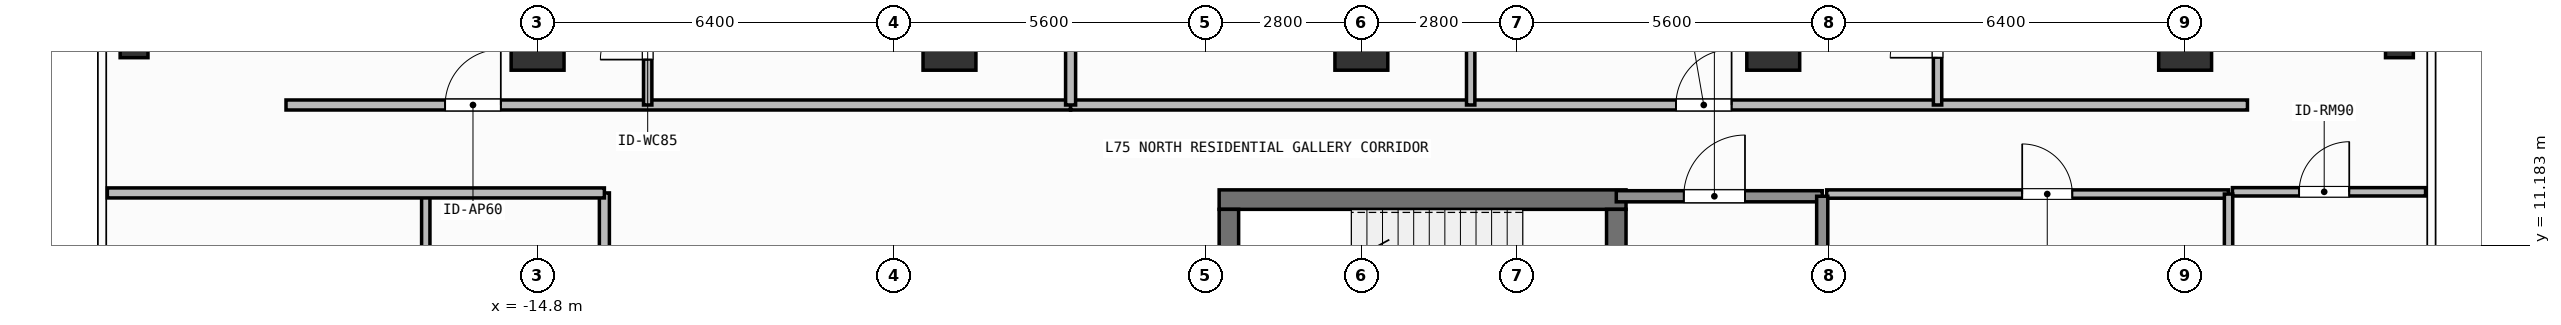
"""IFC4 building model, lengths in metres.
Left out: names, types, materials, properties, quantities, classifications, styles, units other than length and angle.
Written with IfcOpenShell. Run it as: python <this file> out.ifc"""

import sys

from ifc_helpers import new_model, si_unit, direction, frame, frame_2d, origin, origin_2d, place, context, subcontext, project, spatial, rectangle, hollow_rectangle, extrude, element, fill, save


model = new_model("IFC4")
c1 = context("Model", 3, precision=1e-05, world=origin(), true_north=direction((0.0, 1.0)))
c2 = subcontext(c1, "Body", "Model", "MODEL_VIEW")
j1 = project(units=[si_unit("LENGTHUNIT", "METRE"), si_unit("PLANEANGLEUNIT", "RADIAN")], contexts=[c1])
p1 = place(None, origin())
s1 = spatial("IfcSite", under=j1, at=p1, CompositionType="ELEMENT")
p2 = place(p1, origin())
s2 = spatial("IfcBuilding", under=s1, at=p2, CompositionType="ELEMENT")
p3 = place(p2, frame((0.0, 0.0, 305.4)))
s3 = spatial("IfcBuildingStorey", under=s2, at=p3, CompositionType="ELEMENT", Elevation=305.4)
p4 = place(p3, frame((-2.555, 12.0, 0.0), z_axis=(0.0, 0.0, 1.0), x_axis=(1.0, 0.0, 0.0)))
e1 = element("IfcWall", 1, at=p4, inside=s3, PredefinedType="SHEAR", context=c2, shape_type="SweptSolid", body=[
    extrude(rectangle(XDim=7.31, YDim=0.35, at=frame_2d((3.655, 0.0))), origin(), (0.0, 0.0, 1.0), 3.9),
])
p5 = place(p3, frame((-2.38, 8.9, 0.0), z_axis=(0.0, 0.0, 1.0), x_axis=(0.0, 1.0, 0.0)))
e2 = element("IfcWall", 2, at=p5, inside=s3, PredefinedType="SHEAR", context=c2, shape_type="SweptSolid", body=[
    extrude(rectangle(XDim=2.925, YDim=0.35, at=frame_2d((1.462, 0.0))), origin(), (0.0, 0.0, 1.0), 3.9),
])
p6 = place(p3, frame((4.58, 11.825, 0.0), z_axis=(0.0, 0.0, 1.0), x_axis=(0.0, -1.0, 0.0)))
e3 = element("IfcWall", 3, at=p6, inside=s3, PredefinedType="SHEAR", context=c2, shape_type="SweptSolid", body=[
    extrude(rectangle(XDim=2.925, YDim=0.35, at=frame_2d((1.462, 0.0))), origin(), (0.0, 0.0, 1.0), 3.9),
])
p7 = place(p6, frame((0.913, 0.0, 0.0)))
e4 = element("IfcOpeningElement", 4, at=p7, cuts=e3, PredefinedType="OPENING", context=c2, shape_type="SweptSolid", body=[
    extrude(rectangle(XDim=1.1, YDim=2.15, at=frame_2d((0.55, 1.075))), frame((0.0, 0.185, 0.0), z_axis=(0.0, -1.0, 0.0), x_axis=(1.0, 0.0, 0.0)), (0.0, 0.0, 1.0), 0.37),
])
for number, where, z_axis, x_axis in (
    (5, (-14.8, 14.8, 0.0), (0.0, 0.0, 1.0), (1.0, 0.0, 0.0)),
    (6, (-7.4, 14.8, 0.0), (0.0, 0.0, 1.0), (1.0, 0.0, 0.0)),
    (7, (0.0, 14.8, 0.0), (0.0, 0.0, 1.0), (1.0, 0.0, 0.0)),
    (8, (7.4, 14.8, 0.0), (0.0, 0.0, 1.0), (1.0, 0.0, 0.0)),
    (9, (14.8, 14.8, 0.0), (0.0, 0.0, 1.0), (1.0, 0.0, 0.0)),
):
    element("IfcColumn", number, at=place(p3, frame(where, z_axis=z_axis, x_axis=x_axis)), inside=s3, PredefinedType="COLUMN", context=c2, shape_type="SweptSolid", body=[
        extrude(rectangle(XDim=0.95, YDim=0.95, at=origin_2d()), origin(), (0.0, 0.0, 1.0), 3.9),
    ])
for number, where, z_axis, x_axis in (
    (10, (-22.05, 14.8, 0.0), (0.0, 0.0, 1.0), (1.0, 0.0, 0.0)),
    (11, (18.65, 14.8, 0.0), (0.0, 0.0, 1.0), (1.0, 0.0, 0.0)),
):
    element("IfcColumn", number, at=place(p3, frame(where, z_axis=z_axis, x_axis=x_axis)), inside=s3, PredefinedType="COLUMN", context=c2, shape_type="SweptSolid", body=[
        extrude(hollow_rectangle(XDim=0.5, YDim=0.5, WallThickness=0.025, at=origin_2d()), origin(), (0.0, 0.0, 1.0), 3.9),
    ])
p8 = place(p3, frame((4.58, 12.06, 0.0), z_axis=(0.0, 0.0, 1.0), x_axis=(1.0, 0.0, 0.0)))
e12 = element("IfcWall", 12, at=p8, inside=s3, PredefinedType="SOLIDWALL", context=c2, shape_type="SweptSolid", body=[
    extrude(rectangle(XDim=3.7, YDim=0.2, at=frame_2d((1.85, 0.0))), origin(), (0.0, 0.0, 1.0), 3.68),
])
p9 = place(p8, frame((1.212, 0.0, 0.0)))
e13 = element("IfcOpeningElement", 13, at=p9, cuts=e12, PredefinedType="OPENING", context=c2, shape_type="SweptSolid", body=[
    extrude(rectangle(XDim=1.1, YDim=2.15, at=frame_2d((0.55, 1.075))), frame((0.0, 0.11, 0.0), z_axis=(0.0, -1.0, 0.0), x_axis=(1.0, 0.0, 0.0)), (0.0, 0.0, 1.0), 0.22),
])
p10 = place(p3, frame((8.36, 12.1, 0.0), z_axis=(0.0, 0.0, 1.0), x_axis=(1.0, 0.0, 0.0)))
e14 = element("IfcWall", 14, at=p10, inside=s3, PredefinedType="PARTITIONING", context=c2, shape_type="SweptSolid", body=[
    extrude(rectangle(XDim=7.22, YDim=0.15, at=frame_2d((3.61, 0.0))), origin(), (0.0, 0.0, 1.0), 3.68),
])
p11 = place(p10, frame((3.513, 0.0, 0.0)))
e15 = element("IfcOpeningElement", 15, at=p11, cuts=e14, PredefinedType="OPENING", context=c2, shape_type="SweptSolid", body=[
    extrude(rectangle(XDim=0.9, YDim=2.1, at=frame_2d((0.45, 1.05))), frame((0.0, 0.085, 0.0), z_axis=(0.0, -1.0, 0.0), x_axis=(1.0, 0.0, 0.0)), (0.0, 0.0, 1.0), 0.17),
])
p12 = place(p3, frame((-19.32, 13.7, 0.0), z_axis=(0.0, 0.0, 1.0), x_axis=(1.0, 0.0, 0.0)))
e16 = element("IfcWall", 16, at=p12, inside=s3, PredefinedType="PARTITIONING", context=c2, shape_type="SweptSolid", body=[
    extrude(rectangle(XDim=14.096, YDim=0.18, at=frame_2d((7.048, 0.0))), origin(), (0.0, 0.0, 1.0), 3.68),
])
p13 = place(p12, frame((2.859, 0.0, 0.0)))
e17 = element("IfcOpeningElement", 17, at=p13, cuts=e16, PredefinedType="OPENING", context=c2, shape_type="SweptSolid", body=[
    extrude(rectangle(XDim=1.0, YDim=2.2, at=frame_2d((0.5, 1.1))), frame((0.0, 0.1, 0.0), z_axis=(0.0, -1.0, 0.0), x_axis=(1.0, 0.0, 0.0)), (0.0, 0.0, 1.0), 0.2),
])
p14 = place(p3, frame((-12.822, 13.7, 0.0), z_axis=(0.0, 0.0, 1.0), x_axis=(0.0, 1.0, 0.0)))
e18 = element("IfcWall", 18, at=p14, inside=s3, PredefinedType="PARTITIONING", context=c2, shape_type="SweptSolid", body=[
    extrude(rectangle(XDim=2.317, YDim=0.15, at=frame_2d((1.159, 0.0))), origin(), (0.0, 0.0, 1.0), 3.68),
])
p15 = place(p14, frame((0.815, 0.0, 0.0)))
e19 = element("IfcOpeningElement", 19, at=p15, cuts=e18, PredefinedType="OPENING", context=c2, shape_type="SweptSolid", body=[
    extrude(rectangle(XDim=0.85, YDim=2.1, at=frame_2d((0.425, 1.05))), frame((0.0, 0.085, 0.0), z_axis=(0.0, -1.0, 0.0), x_axis=(1.0, 0.0, 0.0)), (0.0, 0.0, 1.0), 0.17),
])
p16 = place(p3, frame((-5.224, 13.7, 0.0), z_axis=(0.0, 0.0, 1.0), x_axis=(1.0, 0.0, 0.0)))
e20 = element("IfcWall", 20, at=p16, inside=s3, PredefinedType="PARTITIONING", context=c2, shape_type="SweptSolid", body=[
    extrude(rectangle(XDim=21.144, YDim=0.18, at=frame_2d((10.572, 0.0))), origin(), (0.0, 0.0, 1.0), 3.68),
])
p17 = place(p16, frame((10.876, 0.0, 0.0)))
e21 = element("IfcOpeningElement", 21, at=p17, cuts=e20, PredefinedType="OPENING", context=c2, shape_type="SweptSolid", body=[
    extrude(rectangle(XDim=1.0, YDim=2.2, at=frame_2d((0.5, 1.1))), frame((0.0, 0.1, 0.0), z_axis=(0.0, -1.0, 0.0), x_axis=(1.0, 0.0, 0.0)), (0.0, 0.0, 1.0), 0.2),
])
p18 = place(p3, frame((1.964, 13.7, 0.0), z_axis=(0.0, 0.0, 1.0), x_axis=(0.0, 1.0, 0.0)))
e22 = element("IfcWall", 22, at=p18, inside=s3, PredefinedType="PARTITIONING", context=c2, shape_type="SweptSolid", body=[
    extrude(rectangle(XDim=4.29, YDim=0.15, at=frame_2d((2.145, 0.0))), origin(), (0.0, 0.0, 1.0), 3.68),
])
p19 = place(p18, frame((1.72, 0.0, 0.0)))
e23 = element("IfcOpeningElement", 23, at=p19, cuts=e22, PredefinedType="OPENING", context=c2, shape_type="SweptSolid", body=[
    extrude(rectangle(XDim=0.85, YDim=2.1, at=frame_2d((0.425, 1.05))), frame((0.0, 0.085, 0.0), z_axis=(0.0, -1.0, 0.0), x_axis=(1.0, 0.0, 0.0)), (0.0, 0.0, 1.0), 0.17),
])
p20 = place(p3, frame((10.352, 13.7, 0.0), z_axis=(0.0, 0.0, 1.0), x_axis=(0.0, 1.0, 0.0)))
e24 = element("IfcWall", 24, at=p20, inside=s3, PredefinedType="PARTITIONING", context=c2, shape_type="SweptSolid", body=[
    extrude(rectangle(XDim=2.72, YDim=0.15, at=frame_2d((1.36, 0.0))), origin(), (0.0, 0.0, 1.0), 3.68),
])
p21 = place(p20, frame((0.849, 0.0, 0.0)))
e25 = element("IfcOpeningElement", 25, at=p21, cuts=e24, PredefinedType="OPENING", context=c2, shape_type="SweptSolid", body=[
    extrude(rectangle(XDim=0.85, YDim=2.1, at=frame_2d((0.425, 1.05))), frame((0.0, 0.085, 0.0), z_axis=(0.0, -1.0, 0.0), x_axis=(1.0, 0.0, 0.0)), (0.0, 0.0, 1.0), 0.17),
])
p22 = place(p3, frame((-13.6, -12.12, 0.0), z_axis=(0.0, 0.0, 1.0), x_axis=(0.0, 1.0, 0.0)))
e26 = element("IfcWall", 26, at=p22, inside=s3, PredefinedType="PARTITIONING", context=c2, shape_type="SweptSolid", body=[
    extrude(rectangle(XDim=24.24, YDim=0.18, at=frame_2d((12.12, 0.0))), origin(), (0.0, 0.0, 1.0), 3.68),
])
p23 = place(p22, frame((9.829, 0.0, 0.0)))
e27 = element("IfcOpeningElement", 27, at=p23, cuts=e26, PredefinedType="OPENING", context=c2, shape_type="SweptSolid", body=[
    extrude(rectangle(XDim=1.0, YDim=2.2, at=frame_2d((0.5, 1.1))), frame((0.0, 0.1, 0.0), z_axis=(0.0, -1.0, 0.0), x_axis=(1.0, 0.0, 0.0)), (0.0, 0.0, 1.0), 0.2),
])
p24 = place(p3, frame((15.65, 12.14, 0.0), z_axis=(0.0, 0.0, 1.0), x_axis=(1.0, 0.0, 0.0)))
e28 = element("IfcWall", 28, at=p24, inside=s3, PredefinedType="PARTITIONING", context=c2, shape_type="SweptSolid", body=[
    extrude(rectangle(XDim=3.47, YDim=0.15, at=frame_2d((1.735, 0.0))), origin(), (0.0, 0.0, 1.0), 3.68),
])
p25 = place(p24, frame((1.198, 0.0, 0.0)))
e29 = element("IfcOpeningElement", 29, at=p25, cuts=e28, PredefinedType="OPENING", context=c2, shape_type="SweptSolid", body=[
    extrude(rectangle(XDim=0.9, YDim=2.1, at=frame_2d((0.45, 1.05))), frame((0.0, 0.085, 0.0), z_axis=(0.0, -1.0, 0.0), x_axis=(1.0, 0.0, 0.0)), (0.0, 0.0, 1.0), 0.17),
])
p26 = place(p3, frame((8.28, 8.725, 0.0), z_axis=(0.0, 0.0, 1.0), x_axis=(0.0, 1.0, 0.0)))
e30 = element("IfcWall", 30, at=p26, inside=s3, PredefinedType="SOLIDWALL", context=c2, shape_type="SweptSolid", body=[
    extrude(rectangle(XDim=3.335, YDim=0.2, at=frame_2d((1.667, 0.0))), origin(), (0.0, 0.0, 1.0), 3.68),
])
p27 = place(p3, frame((15.58, 5.85, 0.0), z_axis=(0.0, 0.0, 1.0), x_axis=(0.0, 1.0, 0.0)))
e31 = element("IfcWall", 31, at=p27, inside=s3, PredefinedType="PARTITIONING", context=c2, shape_type="SweptSolid", body=[
    extrude(rectangle(XDim=6.25, YDim=0.15, at=frame_2d((3.125, 0.0))), origin(), (0.0, 0.0, 1.0), 3.68),
])
p28 = place(p3, frame((-5.224, 13.7, 0.0), z_axis=(0.0, 0.0, 1.0), x_axis=(0.0, 1.0, 0.0)))
e32 = element("IfcWall", 32, at=p28, inside=s3, PredefinedType="PARTITIONING", context=c2, shape_type="SweptSolid", body=[
    extrude(rectangle(XDim=7.33, YDim=0.18, at=frame_2d((3.665, 0.0))), origin(), (0.0, 0.0, 1.0), 3.68),
])
p29 = place(p3, frame((-16.809, 5.436, 0.0), z_axis=(0.0, 0.0, 1.0), x_axis=(0.0, 1.0, 0.0)))
e33 = element("IfcWall", 33, at=p29, inside=s3, PredefinedType="PARTITIONING", context=c2, shape_type="SweptSolid", body=[
    extrude(rectangle(XDim=6.684, YDim=0.15, at=frame_2d((3.342, 0.0))), origin(), (0.0, 0.0, 1.0), 3.68),
])
p30 = place(p3, frame((-22.53, 12.12, 0.0), z_axis=(0.0, 0.0, 1.0), x_axis=(1.0, 0.0, 0.0)))
e34 = element("IfcWall", 34, at=p30, inside=s3, PredefinedType="PARTITIONING", context=c2, shape_type="SweptSolid", body=[
    extrude(rectangle(XDim=8.93, YDim=0.18, at=frame_2d((4.465, 0.0))), origin(), (0.0, 0.0, 1.0), 3.68),
])
p31 = place(p9, origin())
e35 = element("IfcDoor", 35, at=p31, inside=s3, OperationType="SINGLE_SWING_RIGHT", PredefinedType="DOOR", context=c2, shape_type="SweptSolid", body=[
    extrude(rectangle(XDim=1.1, YDim=2.15, at=frame_2d((0.55, 1.075))), frame((0.0, 0.025, 0.0), z_axis=(0.0, -1.0, 0.0), x_axis=(1.0, 0.0, 0.0)), (0.0, 0.0, 1.0), 0.05),
])
fill(e13, e35)
p32 = place(p11, origin())
e36 = element("IfcDoor", 36, at=p32, inside=s3, OperationType="SINGLE_SWING_LEFT", PredefinedType="DOOR", context=c2, shape_type="SweptSolid", body=[
    extrude(rectangle(XDim=0.9, YDim=2.1, at=frame_2d((0.45, 1.05))), frame((0.0, 0.025, 0.0), z_axis=(0.0, -1.0, 0.0), x_axis=(1.0, 0.0, 0.0)), (0.0, 0.0, 1.0), 0.05),
])
fill(e15, e36)
p33 = place(p13, origin())
e37 = element("IfcDoor", 37, at=p33, inside=s3, OperationType="SINGLE_SWING_RIGHT", PredefinedType="DOOR", context=c2, shape_type="SweptSolid", body=[
    extrude(rectangle(XDim=1.0, YDim=2.2, at=frame_2d((0.5, 1.1))), frame((0.0, 0.025, 0.0), z_axis=(0.0, -1.0, 0.0), x_axis=(1.0, 0.0, 0.0)), (0.0, 0.0, 1.0), 0.05),
])
fill(e17, e37)
p34 = place(p15, origin())
e38 = element("IfcDoor", 38, at=p34, inside=s3, OperationType="SINGLE_SWING_LEFT", PredefinedType="DOOR", context=c2, shape_type="SweptSolid", body=[
    extrude(rectangle(XDim=0.85, YDim=2.1, at=frame_2d((0.425, 1.05))), frame((0.0, 0.025, 0.0), z_axis=(0.0, -1.0, 0.0), x_axis=(1.0, 0.0, 0.0)), (0.0, 0.0, 1.0), 0.05),
])
fill(e19, e38)
p35 = place(p17, origin())
e39 = element("IfcDoor", 39, at=p35, inside=s3, OperationType="SINGLE_SWING_RIGHT", PredefinedType="DOOR", context=c2, shape_type="SweptSolid", body=[
    extrude(rectangle(XDim=1.0, YDim=2.2, at=frame_2d((0.5, 1.1))), frame((0.0, 0.025, 0.0), z_axis=(0.0, -1.0, 0.0), x_axis=(1.0, 0.0, 0.0)), (0.0, 0.0, 1.0), 0.05),
])
fill(e21, e39)
p36 = place(p21, origin())
e40 = element("IfcDoor", 40, at=p36, inside=s3, OperationType="SINGLE_SWING_LEFT", PredefinedType="DOOR", context=c2, shape_type="SweptSolid", body=[
    extrude(rectangle(XDim=0.85, YDim=2.1, at=frame_2d((0.425, 1.05))), frame((0.0, 0.025, 0.0), z_axis=(0.0, -1.0, 0.0), x_axis=(1.0, 0.0, 0.0)), (0.0, 0.0, 1.0), 0.05),
])
fill(e25, e40)
p37 = place(p25, origin())
e41 = element("IfcDoor", 41, at=p37, inside=s3, OperationType="SINGLE_SWING_RIGHT", PredefinedType="DOOR", context=c2, shape_type="SweptSolid", body=[
    extrude(rectangle(XDim=0.9, YDim=2.1, at=frame_2d((0.45, 1.05))), frame((0.0, 0.025, 0.0), z_axis=(0.0, -1.0, 0.0), x_axis=(1.0, 0.0, 0.0)), (0.0, 0.0, 1.0), 0.05),
])
fill(e29, e41)
save(model, sys.argv[1])
